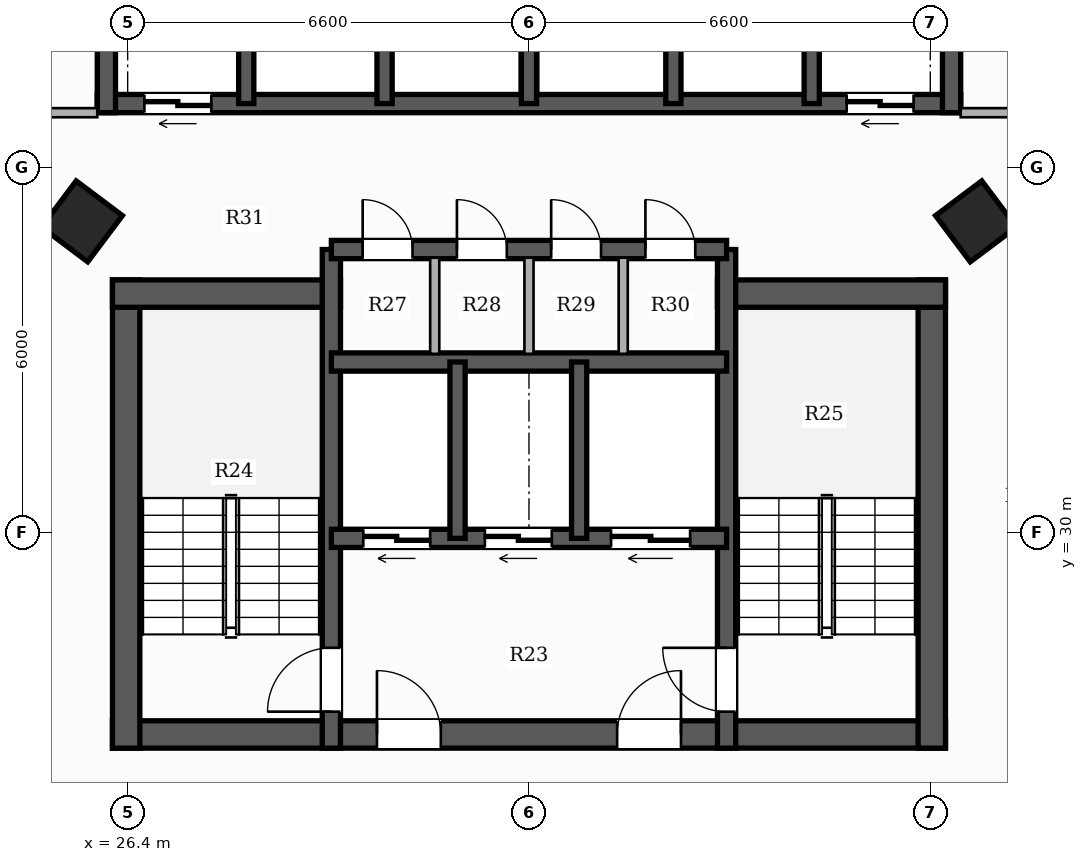
"""IFC4 building model, lengths in metres.
Left out: names, types, materials, properties, quantities, classifications, styles, units other than length and angle.
Written with IfcOpenShell. Run it as: python <this file> out.ifc"""

import sys

from ifc_helpers import new_model, si_unit, direction, frame, frame_2d, origin, origin_2d, place, context, subcontext, project, spatial, rectangle, hollow_rectangle, extrude, element, fill, save


model = new_model("IFC4")
c1 = context("Model", 3, precision=1e-05, world=origin(), true_north=direction((0.0, 1.0)))
c2 = subcontext(c1, "Body", "Model", "MODEL_VIEW")
j1 = project(units=[si_unit("LENGTHUNIT", "METRE"), si_unit("PLANEANGLEUNIT", "RADIAN")], contexts=[c1])
p1 = place(None, origin())
s1 = spatial("IfcSite", under=j1, at=p1, CompositionType="ELEMENT")
p2 = place(p1, origin())
s2 = spatial("IfcBuilding", under=s1, at=p2, CompositionType="ELEMENT")
p3 = place(p2, frame((0.0, 0.0, 43.4)))
s3 = spatial("IfcBuildingStorey", under=s2, at=p3, CompositionType="ELEMENT", Elevation=43.4)
p4 = place(p3, frame((26.15, 26.675, 0.0), z_axis=(0.0, 0.0, 1.0), x_axis=(1.0, 0.0, 0.0)))
e1 = element("IfcWall", 1, at=p4, inside=s3, PredefinedType="SHEAR", context=c2, shape_type="SweptSolid", body=[
    extrude(rectangle(XDim=13.7, YDim=0.45, at=frame_2d((6.85, 0.0))), origin(), (0.0, 0.0, 1.0), 3.3),
])
p5 = place(p4, frame((4.35, 0.0, 0.0)))
e2 = element("IfcOpeningElement", 2, at=p5, cuts=e1, PredefinedType="OPENING", context=c2, shape_type="SweptSolid", body=[
    extrude(rectangle(XDim=1.05, YDim=2.15, at=frame_2d((0.525, 1.075))), frame((0.0, 0.235, 0.0), z_axis=(0.0, -1.0, 0.0), x_axis=(1.0, 0.0, 0.0)), (0.0, 0.0, 1.0), 0.47),
])
p6 = place(p4, frame((8.3, 0.0, 0.0)))
e3 = element("IfcOpeningElement", 3, at=p6, cuts=e1, PredefinedType="OPENING", context=c2, shape_type="SweptSolid", body=[
    extrude(rectangle(XDim=1.05, YDim=2.15, at=frame_2d((0.525, 1.075))), frame((0.0, 0.235, 0.0), z_axis=(0.0, -1.0, 0.0), x_axis=(1.0, 0.0, 0.0)), (0.0, 0.0, 1.0), 0.47),
])
p7 = place(p3, frame((26.375, 26.45, 0.0), z_axis=(0.0, 0.0, 1.0), x_axis=(0.0, 1.0, 0.0)))
e4 = element("IfcWall", 4, at=p7, inside=s3, PredefinedType="SHEAR", context=c2, shape_type="SweptSolid", body=[
    extrude(rectangle(XDim=7.7, YDim=0.45, at=frame_2d((3.85, 0.0))), origin(), (0.0, 0.0, 1.0), 3.3),
])
p8 = place(p3, frame((26.15, 33.925, 0.0), z_axis=(0.0, 0.0, 1.0), x_axis=(1.0, 0.0, 0.0)))
e5 = element("IfcWall", 5, at=p8, inside=s3, PredefinedType="SHEAR", context=c2, shape_type="SweptSolid", body=[
    extrude(rectangle(XDim=3.75, YDim=0.45, at=frame_2d((1.875, 0.0))), origin(), (0.0, 0.0, 1.0), 3.3),
])
p9 = place(p3, frame((39.625, 26.45, 0.0), z_axis=(0.0, 0.0, 1.0), x_axis=(0.0, 1.0, 0.0)))
e6 = element("IfcWall", 6, at=p9, inside=s3, PredefinedType="SHEAR", context=c2, shape_type="SweptSolid", body=[
    extrude(rectangle(XDim=7.7, YDim=0.45, at=frame_2d((3.85, 0.0))), origin(), (0.0, 0.0, 1.0), 3.3),
])
p10 = place(p3, frame((36.1, 33.925, 0.0), z_axis=(0.0, 0.0, 1.0), x_axis=(1.0, 0.0, 0.0)))
e7 = element("IfcWall", 7, at=p10, inside=s3, PredefinedType="SHEAR", context=c2, shape_type="SweptSolid", body=[
    extrude(rectangle(XDim=3.75, YDim=0.45, at=frame_2d((1.875, 0.0))), origin(), (0.0, 0.0, 1.0), 3.3),
])
p11 = place(p3, frame((29.75, 26.45, 0.0), z_axis=(0.0, 0.0, 1.0), x_axis=(0.0, 1.0, 0.0)))
e8 = element("IfcWall", 8, at=p11, inside=s3, PredefinedType="SHEAR", context=c2, shape_type="SweptSolid", body=[
    extrude(rectangle(XDim=8.2, YDim=0.3, at=frame_2d((4.1, 0.0))), origin(), (0.0, 0.0, 1.0), 3.3),
])
p12 = place(p11, frame((0.6, 0.0, 0.0)))
e9 = element("IfcOpeningElement", 9, at=p12, cuts=e8, PredefinedType="OPENING", context=c2, shape_type="SweptSolid", body=[
    extrude(rectangle(XDim=1.05, YDim=2.15, at=frame_2d((0.525, 1.075))), frame((0.0, 0.16, 0.0), z_axis=(0.0, -1.0, 0.0), x_axis=(1.0, 0.0, 0.0)), (0.0, 0.0, 1.0), 0.32),
])
p13 = place(p3, frame((36.25, 26.45, 0.0), z_axis=(0.0, 0.0, 1.0), x_axis=(0.0, 1.0, 0.0)))
e10 = element("IfcWall", 10, at=p13, inside=s3, PredefinedType="SHEAR", context=c2, shape_type="SweptSolid", body=[
    extrude(rectangle(XDim=8.2, YDim=0.3, at=frame_2d((4.1, 0.0))), origin(), (0.0, 0.0, 1.0), 3.3),
])
p14 = place(p13, frame((0.6, 0.0, 0.0)))
e11 = element("IfcOpeningElement", 11, at=p14, cuts=e10, PredefinedType="OPENING", context=c2, shape_type="SweptSolid", body=[
    extrude(rectangle(XDim=1.05, YDim=2.15, at=frame_2d((0.525, 1.075))), frame((0.0, 0.16, 0.0), z_axis=(0.0, -1.0, 0.0), x_axis=(1.0, 0.0, 0.0)), (0.0, 0.0, 1.0), 0.32),
])
p15 = place(p3, frame((36.25, 29.9, 0.0), z_axis=(0.0, 0.0, 1.0), x_axis=(-1.0, 0.0, 0.0)))
e12 = element("IfcWall", 12, at=p15, inside=s3, PredefinedType="SHEAR", context=c2, shape_type="SweptSolid", body=[
    extrude(rectangle(XDim=6.5, YDim=0.3, at=frame_2d((3.25, 0.0))), origin(), (0.0, 0.0, 1.0), 3.3),
])
p16 = place(p15, frame((4.875, 0.0, 0.0)))
e13 = element("IfcOpeningElement", 13, at=p16, cuts=e12, PredefinedType="OPENING", context=c2, shape_type="SweptSolid", body=[
    extrude(rectangle(XDim=1.1, YDim=2.2, at=frame_2d((0.55, 1.1))), frame((0.0, 0.16, 0.0), z_axis=(0.0, -1.0, 0.0), x_axis=(1.0, 0.0, 0.0)), (0.0, 0.0, 1.0), 0.32),
])
p17 = place(p15, frame((2.875, 0.0, 0.0)))
e14 = element("IfcOpeningElement", 14, at=p17, cuts=e12, PredefinedType="OPENING", context=c2, shape_type="SweptSolid", body=[
    extrude(rectangle(XDim=1.1, YDim=2.2, at=frame_2d((0.55, 1.1))), frame((0.0, 0.16, 0.0), z_axis=(0.0, -1.0, 0.0), x_axis=(1.0, 0.0, 0.0)), (0.0, 0.0, 1.0), 0.32),
])
p18 = place(p15, frame((0.6, 0.0, 0.0)))
e15 = element("IfcOpeningElement", 15, at=p18, cuts=e12, PredefinedType="OPENING", context=c2, shape_type="SweptSolid", body=[
    extrude(rectangle(XDim=1.3, YDim=2.2, at=frame_2d((0.65, 1.1))), frame((0.0, 0.16, 0.0), z_axis=(0.0, -1.0, 0.0), x_axis=(1.0, 0.0, 0.0)), (0.0, 0.0, 1.0), 0.32),
])
p19 = place(p3, frame((29.75, 32.8, 0.0), z_axis=(0.0, 0.0, 1.0), x_axis=(1.0, 0.0, 0.0)))
e16 = element("IfcWall", 16, at=p19, inside=s3, PredefinedType="SHEAR", context=c2, shape_type="SweptSolid", body=[
    extrude(rectangle(XDim=6.5, YDim=0.3, at=frame_2d((3.25, 0.0))), origin(), (0.0, 0.0, 1.0), 3.3),
])
for number, where, z_axis, x_axis in (
    (17, (31.825, 29.9, 0.0), (0.0, 0.0, 1.0), (0.0, 1.0, 0.0)),
    (18, (33.825, 29.9, 0.0), (0.0, 0.0, 1.0), (0.0, 1.0, 0.0)),
):
    element("IfcWall", number, at=place(p3, frame(where, z_axis=z_axis, x_axis=x_axis)), inside=s3, PredefinedType="SHEAR", context=c2, shape_type="SweptSolid", body=[
        extrude(rectangle(XDim=2.9, YDim=0.25, at=frame_2d((1.45, 0.0))), origin(), (0.0, 0.0, 1.0), 3.3),
    ])
p20 = place(p3, frame((29.75, 34.65, 0.0), z_axis=(0.0, 0.0, 1.0), x_axis=(1.0, 0.0, 0.0)))
e19 = element("IfcWall", 19, at=p20, inside=s3, PredefinedType="SHEAR", context=c2, shape_type="SweptSolid", body=[
    extrude(rectangle(XDim=6.5, YDim=0.3, at=frame_2d((3.25, 0.0))), origin(), (0.0, 0.0, 1.0), 3.3),
])
p21 = place(p20, frame((0.515, 0.0, 0.0)))
e20 = element("IfcOpeningElement", 20, at=p21, cuts=e19, PredefinedType="OPENING", context=c2, shape_type="SweptSolid", body=[
    extrude(rectangle(XDim=0.82, YDim=2.1, at=frame_2d((0.41, 1.05))), frame((0.0, 0.16, 0.0), z_axis=(0.0, -1.0, 0.0), x_axis=(1.0, 0.0, 0.0)), (0.0, 0.0, 1.0), 0.32),
])
p22 = place(p20, frame((2.065, 0.0, 0.0)))
e21 = element("IfcOpeningElement", 21, at=p22, cuts=e19, PredefinedType="OPENING", context=c2, shape_type="SweptSolid", body=[
    extrude(rectangle(XDim=0.82, YDim=2.1, at=frame_2d((0.41, 1.05))), frame((0.0, 0.16, 0.0), z_axis=(0.0, -1.0, 0.0), x_axis=(1.0, 0.0, 0.0)), (0.0, 0.0, 1.0), 0.32),
])
p23 = place(p20, frame((3.615, 0.0, 0.0)))
e22 = element("IfcOpeningElement", 22, at=p23, cuts=e19, PredefinedType="OPENING", context=c2, shape_type="SweptSolid", body=[
    extrude(rectangle(XDim=0.82, YDim=2.1, at=frame_2d((0.41, 1.05))), frame((0.0, 0.16, 0.0), z_axis=(0.0, -1.0, 0.0), x_axis=(1.0, 0.0, 0.0)), (0.0, 0.0, 1.0), 0.32),
])
p24 = place(p20, frame((5.165, 0.0, 0.0)))
e23 = element("IfcOpeningElement", 23, at=p24, cuts=e19, PredefinedType="OPENING", context=c2, shape_type="SweptSolid", body=[
    extrude(rectangle(XDim=0.82, YDim=2.1, at=frame_2d((0.41, 1.05))), frame((0.0, 0.16, 0.0), z_axis=(0.0, -1.0, 0.0), x_axis=(1.0, 0.0, 0.0)), (0.0, 0.0, 1.0), 0.32),
])
p25 = place(p3, frame((40.1, 37.05, 0.0), z_axis=(0.0, 0.0, 1.0), x_axis=(-1.0, 0.0, 0.0)))
e24 = element("IfcWall", 24, at=p25, inside=s3, PredefinedType="SHEAR", context=c2, shape_type="SweptSolid", body=[
    extrude(rectangle(XDim=14.2, YDim=0.3, at=frame_2d((7.1, 0.0))), origin(), (0.0, 0.0, 1.0), 3.3),
])
p26 = place(p25, frame((12.325, 0.0, 0.0)))
e25 = element("IfcOpeningElement", 25, at=p26, cuts=e24, PredefinedType="OPENING", context=c2, shape_type="SweptSolid", body=[
    extrude(rectangle(XDim=1.1, YDim=2.2, at=frame_2d((0.55, 1.1))), frame((0.0, 0.16, 0.0), z_axis=(0.0, -1.0, 0.0), x_axis=(1.0, 0.0, 0.0)), (0.0, 0.0, 1.0), 0.32),
])
p27 = place(p25, frame((0.775, 0.0, 0.0)))
e26 = element("IfcOpeningElement", 26, at=p27, cuts=e24, PredefinedType="OPENING", context=c2, shape_type="SweptSolid", body=[
    extrude(rectangle(XDim=1.1, YDim=2.2, at=frame_2d((0.55, 1.1))), frame((0.0, 0.16, 0.0), z_axis=(0.0, -1.0, 0.0), x_axis=(1.0, 0.0, 0.0)), (0.0, 0.0, 1.0), 0.32),
])
for number, where, z_axis, x_axis in (
    (27, (26.05, 36.9, 0.0), (0.0, 0.0, 1.0), (0.0, 1.0, 0.0)),
    (28, (39.95, 36.9, 0.0), (0.0, 0.0, 1.0), (0.0, 1.0, 0.0)),
):
    element("IfcWall", number, at=place(p3, frame(where, z_axis=z_axis, x_axis=x_axis)), inside=s3, PredefinedType="SHEAR", context=c2, shape_type="SweptSolid", body=[
        extrude(rectangle(XDim=2.85, YDim=0.3, at=frame_2d((1.425, 0.0))), origin(), (0.0, 0.0, 1.0), 3.3),
    ])
for number, where, z_axis, x_axis in (
    (29, (28.35, 37.05, 0.0), (0.0, 0.0, 1.0), (0.0, 1.0, 0.0)),
    (30, (30.625, 37.05, 0.0), (0.0, 0.0, 1.0), (0.0, 1.0, 0.0)),
    (31, (33.0, 37.05, 0.0), (0.0, 0.0, 1.0), (0.0, 1.0, 0.0)),
    (32, (35.375, 37.05, 0.0), (0.0, 0.0, 1.0), (0.0, 1.0, 0.0)),
    (33, (37.65, 37.05, 0.0), (0.0, 0.0, 1.0), (0.0, 1.0, 0.0)),
):
    element("IfcWall", number, at=place(p3, frame(where, z_axis=z_axis, x_axis=x_axis)), inside=s3, PredefinedType="SHEAR", context=c2, shape_type="SweptSolid", body=[
        extrude(rectangle(XDim=2.55, YDim=0.25, at=frame_2d((1.275, 0.0))), origin(), (0.0, 0.0, 1.0), 3.3),
    ])
for number, where, z_axis, x_axis in (
    (34, (25.648, 35.113, 0.0), (0.0, 0.0, 1.0), (0.6, 0.8, 0.0)),
    (35, (40.352, 35.113, 0.0), (0.0, 0.0, 1.0), (-0.6, 0.8, 0.0)),
):
    element("IfcColumn", number, at=place(p3, frame(where, z_axis=z_axis, x_axis=x_axis)), inside=s3, PredefinedType="COLUMN", context=c2, shape_type="SweptSolid", body=[
        extrude(hollow_rectangle(XDim=0.95, YDim=0.95, WallThickness=0.032, at=origin_2d()), origin(), (0.0, 0.0, 1.0), 3.3),
    ])
for number, where, z_axis, x_axis in (
    (36, (31.45, 32.935, 0.0), (0.0, 0.0, 1.0), (0.0, 1.0, 0.0)),
    (37, (33.0, 32.935, 0.0), (0.0, 0.0, 1.0), (0.0, 1.0, 0.0)),
    (38, (34.55, 32.935, 0.0), (0.0, 0.0, 1.0), (0.0, 1.0, 0.0)),
):
    element("IfcWall", number, at=place(p3, frame(where, z_axis=z_axis, x_axis=x_axis)), inside=s3, PredefinedType="PARTITIONING", context=c2, shape_type="SweptSolid", body=[
        extrude(rectangle(XDim=1.58, YDim=0.15, at=frame_2d((0.79, 0.0))), origin(), (0.0, 0.0, 1.0), 3.06),
    ])
p28 = place(p3, frame((40.1, 36.9, 0.0), z_axis=(0.0, 0.0, 1.0), x_axis=(1.0, 0.0, 0.0)))
e39 = element("IfcWall", 39, at=p28, inside=s3, PredefinedType="PARTITIONING", context=c2, shape_type="SweptSolid", body=[
    extrude(rectangle(XDim=2.55, YDim=0.15, at=frame_2d((1.275, 0.0))), origin(), (0.0, 0.0, 1.0), 2.413),
])
p29 = place(p3, frame((23.41, 36.9, 0.0), z_axis=(0.0, 0.0, 1.0), x_axis=(1.0, 0.0, 0.0)))
e40 = element("IfcWall", 40, at=p29, inside=s3, PredefinedType="PARTITIONING", context=c2, shape_type="SweptSolid", body=[
    extrude(rectangle(XDim=2.49, YDim=0.15, at=frame_2d((1.245, 0.0))), origin(), (0.0, 0.0, 1.0), 2.413),
])
p30 = place(p12, origin())
e41 = element("IfcDoor", 41, at=p30, inside=s3, OperationType="SINGLE_SWING_LEFT", PredefinedType="DOOR", context=c2, shape_type="SweptSolid", body=[
    extrude(rectangle(XDim=1.05, YDim=2.15, at=frame_2d((0.525, 1.075))), frame((0.0, 0.025, 0.0), z_axis=(0.0, -1.0, 0.0), x_axis=(1.0, 0.0, 0.0)), (0.0, 0.0, 1.0), 0.05),
])
fill(e9, e41)
p31 = place(p14, origin())
e42 = element("IfcDoor", 42, at=p31, inside=s3, OperationType="SINGLE_SWING_RIGHT", PredefinedType="DOOR", context=c2, shape_type="SweptSolid", body=[
    extrude(rectangle(XDim=1.05, YDim=2.15, at=frame_2d((0.525, 1.075))), frame((0.0, 0.025, 0.0), z_axis=(0.0, -1.0, 0.0), x_axis=(1.0, 0.0, 0.0)), (0.0, 0.0, 1.0), 0.05),
])
fill(e11, e42)
p32 = place(p5, origin())
e43 = element("IfcDoor", 43, at=p32, inside=s3, OperationType="SINGLE_SWING_LEFT", PredefinedType="DOOR", context=c2, shape_type="SweptSolid", body=[
    extrude(rectangle(XDim=1.05, YDim=2.15, at=frame_2d((0.525, 1.075))), frame((0.0, 0.025, 0.0), z_axis=(0.0, -1.0, 0.0), x_axis=(1.0, 0.0, 0.0)), (0.0, 0.0, 1.0), 0.05),
])
fill(e2, e43)
p33 = place(p6, origin())
e44 = element("IfcDoor", 44, at=p33, inside=s3, OperationType="SINGLE_SWING_RIGHT", PredefinedType="DOOR", context=c2, shape_type="SweptSolid", body=[
    extrude(rectangle(XDim=1.05, YDim=2.15, at=frame_2d((0.525, 1.075))), frame((0.0, 0.025, 0.0), z_axis=(0.0, -1.0, 0.0), x_axis=(1.0, 0.0, 0.0)), (0.0, 0.0, 1.0), 0.05),
])
fill(e3, e44)
p34 = place(p16, origin())
e45 = element("IfcDoor", 45, at=p34, inside=s3, OperationType="DOUBLE_DOOR_SLIDING", PredefinedType="DOOR", context=c2, shape_type="SweptSolid", body=[
    extrude(rectangle(XDim=1.1, YDim=2.2, at=frame_2d((0.55, 1.1))), frame((0.0, 0.025, 0.0), z_axis=(0.0, -1.0, 0.0), x_axis=(1.0, 0.0, 0.0)), (0.0, 0.0, 1.0), 0.05),
])
fill(e13, e45)
p35 = place(p17, origin())
e46 = element("IfcDoor", 46, at=p35, inside=s3, OperationType="DOUBLE_DOOR_SLIDING", PredefinedType="DOOR", context=c2, shape_type="SweptSolid", body=[
    extrude(rectangle(XDim=1.1, YDim=2.2, at=frame_2d((0.55, 1.1))), frame((0.0, 0.025, 0.0), z_axis=(0.0, -1.0, 0.0), x_axis=(1.0, 0.0, 0.0)), (0.0, 0.0, 1.0), 0.05),
])
fill(e14, e46)
p36 = place(p18, origin())
e47 = element("IfcDoor", 47, at=p36, inside=s3, OperationType="DOUBLE_DOOR_SLIDING", PredefinedType="DOOR", context=c2, shape_type="SweptSolid", body=[
    extrude(rectangle(XDim=1.3, YDim=2.2, at=frame_2d((0.65, 1.1))), frame((0.0, 0.025, 0.0), z_axis=(0.0, -1.0, 0.0), x_axis=(1.0, 0.0, 0.0)), (0.0, 0.0, 1.0), 0.05),
])
fill(e15, e47)
p37 = place(p26, origin())
e48 = element("IfcDoor", 48, at=p37, inside=s3, OperationType="DOUBLE_DOOR_SLIDING", PredefinedType="DOOR", context=c2, shape_type="SweptSolid", body=[
    extrude(rectangle(XDim=1.1, YDim=2.2, at=frame_2d((0.55, 1.1))), frame((0.0, 0.025, 0.0), z_axis=(0.0, -1.0, 0.0), x_axis=(1.0, 0.0, 0.0)), (0.0, 0.0, 1.0), 0.05),
])
fill(e25, e48)
p38 = place(p27, origin())
e49 = element("IfcDoor", 49, at=p38, inside=s3, OperationType="DOUBLE_DOOR_SLIDING", PredefinedType="DOOR", context=c2, shape_type="SweptSolid", body=[
    extrude(rectangle(XDim=1.1, YDim=2.2, at=frame_2d((0.55, 1.1))), frame((0.0, 0.025, 0.0), z_axis=(0.0, -1.0, 0.0), x_axis=(1.0, 0.0, 0.0)), (0.0, 0.0, 1.0), 0.05),
])
fill(e26, e49)
p39 = place(p21, origin())
e50 = element("IfcDoor", 50, at=p39, inside=s3, OperationType="SINGLE_SWING_LEFT", PredefinedType="DOOR", context=c2, shape_type="SweptSolid", body=[
    extrude(rectangle(XDim=0.82, YDim=2.1, at=frame_2d((0.41, 1.05))), frame((0.0, 0.025, 0.0), z_axis=(0.0, -1.0, 0.0), x_axis=(1.0, 0.0, 0.0)), (0.0, 0.0, 1.0), 0.05),
])
fill(e20, e50)
p40 = place(p22, origin())
e51 = element("IfcDoor", 51, at=p40, inside=s3, OperationType="SINGLE_SWING_LEFT", PredefinedType="DOOR", context=c2, shape_type="SweptSolid", body=[
    extrude(rectangle(XDim=0.82, YDim=2.1, at=frame_2d((0.41, 1.05))), frame((0.0, 0.025, 0.0), z_axis=(0.0, -1.0, 0.0), x_axis=(1.0, 0.0, 0.0)), (0.0, 0.0, 1.0), 0.05),
])
fill(e21, e51)
p41 = place(p23, origin())
e52 = element("IfcDoor", 52, at=p41, inside=s3, OperationType="SINGLE_SWING_LEFT", PredefinedType="DOOR", context=c2, shape_type="SweptSolid", body=[
    extrude(rectangle(XDim=0.82, YDim=2.1, at=frame_2d((0.41, 1.05))), frame((0.0, 0.025, 0.0), z_axis=(0.0, -1.0, 0.0), x_axis=(1.0, 0.0, 0.0)), (0.0, 0.0, 1.0), 0.05),
])
fill(e22, e52)
p42 = place(p24, origin())
e53 = element("IfcDoor", 53, at=p42, inside=s3, OperationType="SINGLE_SWING_LEFT", PredefinedType="DOOR", context=c2, shape_type="SweptSolid", body=[
    extrude(rectangle(XDim=0.82, YDim=2.1, at=frame_2d((0.41, 1.05))), frame((0.0, 0.025, 0.0), z_axis=(0.0, -1.0, 0.0), x_axis=(1.0, 0.0, 0.0)), (0.0, 0.0, 1.0), 0.05),
])
fill(e23, e53)
save(model, sys.argv[1])
